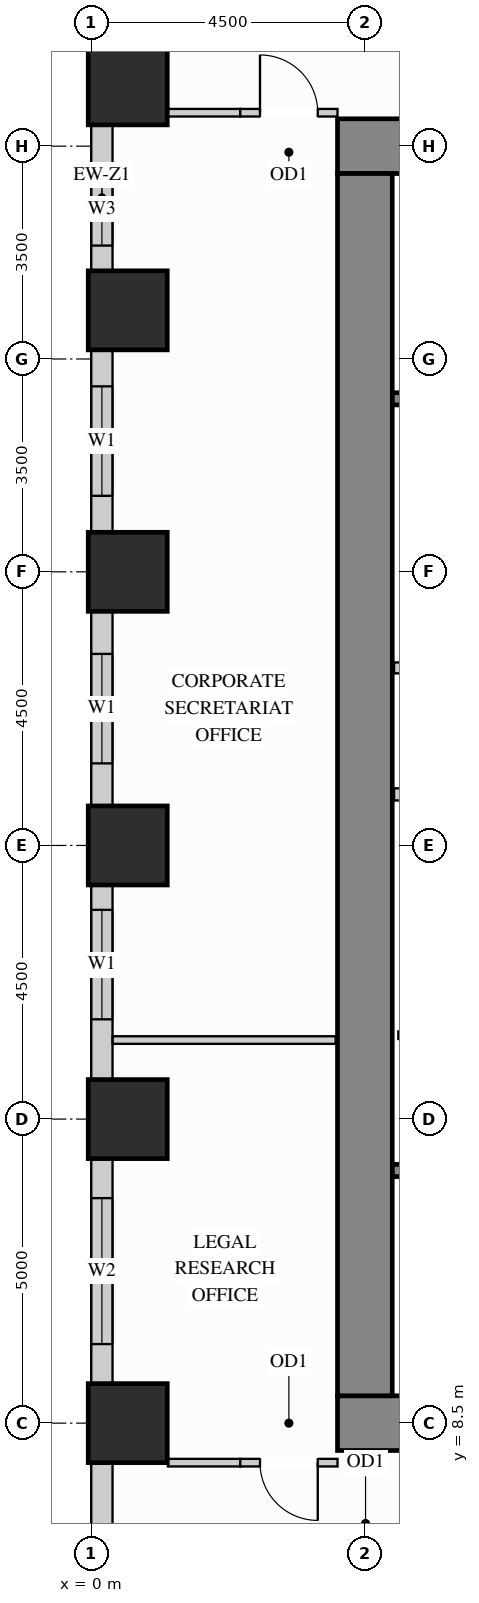
"""IFC4 building model, lengths in metres.
Left out: names, types, materials, properties, quantities, classifications, styles, units other than length and angle.
Written with IfcOpenShell. Run it as: python <this file> out.ifc"""

import sys

from ifc_helpers import new_model, si_unit, direction, frame, frame_2d, origin, origin_2d, place, context, subcontext, project, spatial, rectangle, extrude, source, transform, mapped, element, fill, save


model = new_model("IFC4")
c1 = context("Model", 3, precision=1e-05, world=origin(), true_north=direction((0.0, 1.0)))
c2 = subcontext(c1, "Body", "Model", "MODEL_VIEW")
j1 = project(units=[si_unit("LENGTHUNIT", "METRE"), si_unit("PLANEANGLEUNIT", "RADIAN")], contexts=[c1])
p1 = place(None, origin())
s1 = spatial("IfcSite", under=j1, at=p1, CompositionType="ELEMENT")
p2 = place(p1, origin())
s2 = spatial("IfcBuilding", under=s1, at=p2, CompositionType="ELEMENT")
p3 = place(p2, frame((0.0, 0.0, 69.3)))
s3 = spatial("IfcBuildingStorey", under=s2, at=p3, CompositionType="ELEMENT", Elevation=69.3)
m1 = source(origin(), c2, "Body", "SweptSolid", [
    extrude(rectangle(XDim=1.3, YDim=1.3, at=origin_2d()), origin(), (0.0, 0.0, 1.0), 3.32),
])
for number, where, z_axis, x_axis in (
    (1, (0.6, 13.5, 0.0), (0.0, 0.0, 1.0), (1.0, 0.0, 0.0)),
    (2, (0.6, 18.0, 0.0), (0.0, 0.0, 1.0), (1.0, 0.0, 0.0)),
    (3, (0.6, 22.5, 0.0), (0.0, 0.0, 1.0), (1.0, 0.0, 0.0)),
    (4, (0.6, 26.8, 0.0), (0.0, 0.0, 1.0), (1.0, 0.0, 0.0)),
    (5, (0.6, 30.5, 0.0), (0.0, 0.0, 1.0), (1.0, 0.0, 0.0)),
    (6, (0.6, 8.5, 0.0), (0.0, 0.0, 1.0), (1.0, 0.0, 0.0)),
):
    element("IfcColumn", number, at=place(p3, frame(where, z_axis=z_axis, x_axis=x_axis)), inside=s3, PredefinedType="COLUMN", context=c2, shape_type="MappedRepresentation", body=[
        mapped(m1, transform((0.0, 0.0, 0.0), x_axis=(1.0, 0.0, 0.0), y_axis=(0.0, 1.0, 0.0), z_axis=(0.0, 0.0, 1.0))),
    ])
m2 = source(origin(), c2, "Body", "SweptSolid", [
    extrude(rectangle(XDim=10.9, YDim=0.9, at=frame_2d((5.45, 0.0))), origin(), (0.0, 0.0, 1.0), 3.32),
])
for number, where, z_axis, x_axis in (
    (7, (4.05, 29.5, 0.0), (0.0, 0.0, 1.0), (1.0, 0.0, 0.0)),
    (8, (4.05, 8.5, 0.0), (0.0, 0.0, 1.0), (1.0, 0.0, 0.0)),
):
    element("IfcWall", number, at=place(p3, frame(where, z_axis=z_axis, x_axis=x_axis)), inside=s3, PredefinedType="SHEAR", context=c2, shape_type="MappedRepresentation", body=[
        mapped(m2, transform((0.0, 0.0, 0.0), x_axis=(1.0, 0.0, 0.0), y_axis=(0.0, 1.0, 0.0), z_axis=(0.0, 0.0, 1.0))),
    ])
m3 = source(origin(), c2, "Body", "SweptSolid", [
    extrude(rectangle(XDim=20.1, YDim=0.9, at=frame_2d((10.05, 0.0))), origin(), (0.0, 0.0, 1.0), 3.32),
])
p4 = place(p3, frame((4.5, 8.95, 0.0), z_axis=(0.0, 0.0, 1.0), x_axis=(0.0, 1.0, 0.0)))
e9 = element("IfcWall", 9, at=p4, inside=s3, PredefinedType="SHEAR", context=c2, shape_type="MappedRepresentation", body=[
    mapped(m3, transform((0.0, 0.0, 0.0), x_axis=(1.0, 0.0, 0.0), y_axis=(0.0, 1.0, 0.0), z_axis=(0.0, 0.0, 1.0))),
])
p5 = place(p3, frame((0.175, 29.852, 0.0), z_axis=(0.0, 0.0, 1.0), x_axis=(0.0, -1.0, 0.0)))
e10 = element("IfcWall", 10, at=p5, inside=s3, PredefinedType="SOLIDWALL", context=c2, shape_type="SweptSolid", body=[
    extrude(rectangle(XDim=2.404, YDim=0.35, at=frame_2d((1.202, 0.0))), origin(), (0.0, 0.0, 1.0), 2.45),
])
p6 = place(p5, frame((0.787, 0.0, 0.78)))
e11 = element("IfcOpeningElement", 11, at=p6, cuts=e10, PredefinedType="OPENING", context=c2, shape_type="SweptSolid", body=[
    extrude(rectangle(XDim=1.2, YDim=1.49, at=frame_2d((0.6, 0.745))), frame((0.0, 0.185, 0.0), z_axis=(0.0, -1.0, 0.0), x_axis=(1.0, 0.0, 0.0)), (0.0, 0.0, 1.0), 0.37),
])
p7 = place(p3, frame((0.175, 26.152, 0.0), z_axis=(0.0, 0.0, 1.0), x_axis=(0.0, -1.0, 0.0)))
e12 = element("IfcWall", 12, at=p7, inside=s3, PredefinedType="SOLIDWALL", context=c2, shape_type="SweptSolid", body=[
    extrude(rectangle(XDim=3.004, YDim=0.35, at=frame_2d((1.502, 0.0))), origin(), (0.0, 0.0, 1.0), 2.45),
])
p8 = place(p7, frame((0.602, 0.0, 0.78)))
e13 = element("IfcOpeningElement", 13, at=p8, cuts=e12, PredefinedType="OPENING", context=c2, shape_type="SweptSolid", body=[
    extrude(rectangle(XDim=1.8, YDim=1.49, at=frame_2d((0.9, 0.745))), frame((0.0, 0.185, 0.0), z_axis=(0.0, -1.0, 0.0), x_axis=(1.0, 0.0, 0.0)), (0.0, 0.0, 1.0), 0.37),
])
p9 = place(p3, frame((0.175, 21.852, 0.0), z_axis=(0.0, 0.0, 1.0), x_axis=(0.0, -1.0, 0.0)))
e14 = element("IfcWall", 14, at=p9, inside=s3, PredefinedType="SOLIDWALL", context=c2, shape_type="SweptSolid", body=[
    extrude(rectangle(XDim=3.204, YDim=0.35, at=frame_2d((1.602, 0.0))), origin(), (0.0, 0.0, 1.0), 2.45),
])
p10 = place(p9, frame((0.702, 0.0, 0.78)))
e15 = element("IfcOpeningElement", 15, at=p10, cuts=e14, PredefinedType="OPENING", context=c2, shape_type="SweptSolid", body=[
    extrude(rectangle(XDim=1.8, YDim=1.49, at=frame_2d((0.9, 0.745))), frame((0.0, 0.185, 0.0), z_axis=(0.0, -1.0, 0.0), x_axis=(1.0, 0.0, 0.0)), (0.0, 0.0, 1.0), 0.37),
])
p11 = place(p3, frame((0.175, 17.352, 0.0), z_axis=(0.0, 0.0, 1.0), x_axis=(0.0, -1.0, 0.0)))
e16 = element("IfcWall", 16, at=p11, inside=s3, PredefinedType="SOLIDWALL", context=c2, shape_type="SweptSolid", body=[
    extrude(rectangle(XDim=3.204, YDim=0.35, at=frame_2d((1.602, 0.0))), origin(), (0.0, 0.0, 1.0), 2.45),
])
p12 = place(p11, frame((0.411, 0.0, 0.78)))
e17 = element("IfcOpeningElement", 17, at=p12, cuts=e16, PredefinedType="OPENING", context=c2, shape_type="SweptSolid", body=[
    extrude(rectangle(XDim=1.8, YDim=1.49, at=frame_2d((0.9, 0.745))), frame((0.0, 0.185, 0.0), z_axis=(0.0, -1.0, 0.0), x_axis=(1.0, 0.0, 0.0)), (0.0, 0.0, 1.0), 0.37),
])
p13 = place(p3, frame((0.175, 12.852, 0.0), z_axis=(0.0, 0.0, 1.0), x_axis=(0.0, -1.0, 0.0)))
e18 = element("IfcWall", 18, at=p13, inside=s3, PredefinedType="SOLIDWALL", context=c2, shape_type="SweptSolid", body=[
    extrude(rectangle(XDim=3.704, YDim=0.35, at=frame_2d((1.852, 0.0))), origin(), (0.0, 0.0, 1.0), 2.45),
])
p14 = place(p13, frame((0.652, 0.0, 0.78)))
e19 = element("IfcOpeningElement", 19, at=p14, cuts=e18, PredefinedType="OPENING", context=c2, shape_type="SweptSolid", body=[
    extrude(rectangle(XDim=2.4, YDim=1.49, at=frame_2d((1.2, 0.745))), frame((0.0, 0.185, 0.0), z_axis=(0.0, -1.0, 0.0), x_axis=(1.0, 0.0, 0.0)), (0.0, 0.0, 1.0), 0.37),
])
p15 = place(p3, frame((0.175, 7.852, 0.0), z_axis=(0.0, 0.0, 1.0), x_axis=(0.0, -1.0, 0.0)))
e20 = element("IfcWall", 20, at=p15, inside=s3, PredefinedType="SOLIDWALL", context=c2, shape_type="SweptSolid", body=[
    extrude(rectangle(XDim=3.704, YDim=0.35, at=frame_2d((1.852, 0.0))), origin(), (0.0, 0.0, 1.0), 2.45),
])
p16 = place(p15, frame((2.043, 0.0, 0.78)))
e21 = element("IfcOpeningElement", 21, at=p16, cuts=e20, PredefinedType="OPENING", context=c2, shape_type="SweptSolid", body=[
    extrude(rectangle(XDim=1.2, YDim=1.49, at=frame_2d((0.6, 0.745))), frame((0.0, 0.185, 0.0), z_axis=(0.0, -1.0, 0.0), x_axis=(1.0, 0.0, 0.0)), (0.0, 0.0, 1.0), 0.37),
])
m4 = source(origin(), c2, "Body", "SweptSolid", [
    extrude(rectangle(XDim=2.17, YDim=0.18, at=frame_2d((1.085, 0.0))), origin(), (0.0, 0.0, 1.0), 3.305),
])
p17 = place(p3, frame((4.98, 20.92, 0.0), z_axis=(0.0, 0.0, 1.0), x_axis=(1.0, 0.0, 0.0)))
e22 = element("IfcWall", 22, at=p17, inside=s3, PredefinedType="PARTITIONING", context=c2, shape_type="MappedRepresentation", body=[
    mapped(m4, transform((0.0, 0.0, 0.0), x_axis=(1.0, 0.0, 0.0), y_axis=(0.0, 1.0, 0.0), z_axis=(0.0, 0.0, 1.0))),
])
p18 = place(p3, frame((5.05, 14.88, 0.0), z_axis=(0.0, 0.0, 1.0), x_axis=(1.0, 0.0, 0.0)))
e23 = element("IfcWall", 23, at=p18, inside=s3, PredefinedType="PARTITIONING", context=c2, shape_type="SweptSolid", body=[
    extrude(rectangle(XDim=2.35, YDim=0.125, at=frame_2d((1.175, 0.0))), origin(), (0.0, 0.0, 1.0), 3.305),
])
p19 = place(p18, frame((0.7, 0.0, 0.0)))
e24 = element("IfcOpeningElement", 24, at=p19, cuts=e23, PredefinedType="OPENING", context=c2, shape_type="SweptSolid", body=[
    extrude(rectangle(XDim=0.85, YDim=2.1, at=frame_2d((0.425, 1.05))), frame((0.0, 0.073, 0.0), z_axis=(0.0, -1.0, 0.0), x_axis=(1.0, 0.0, 0.0)), (0.0, 0.0, 1.0), 0.145),
])
m5 = source(origin(), c2, "Body", "SweptSolid", [
    extrude(rectangle(XDim=1.19, YDim=0.125, at=frame_2d((0.595, 0.0))), origin(), (0.0, 0.0, 1.0), 3.305),
])
p20 = place(p3, frame((1.26, 30.05, 0.0), z_axis=(0.0, 0.0, 1.0), x_axis=(1.0, 0.0, 0.0)))
e25 = element("IfcWall", 25, at=p20, inside=s3, PredefinedType="PARTITIONING", context=c2, shape_type="MappedRepresentation", body=[
    mapped(m5, transform((0.0, 0.0, 0.0), x_axis=(1.0, 0.0, 0.0), y_axis=(0.0, 1.0, 0.0), z_axis=(0.0, 0.0, 1.0))),
])
p21 = place(p3, frame((2.45, 30.05, 0.0), z_axis=(0.0, 0.0, 1.0), x_axis=(1.0, 0.0, 0.0)))
e26 = element("IfcWall", 26, at=p21, inside=s3, PredefinedType="PARTITIONING", context=c2, shape_type="SweptSolid", body=[
    extrude(rectangle(XDim=1.6, YDim=0.125, at=frame_2d((0.8, 0.0))), origin(), (0.0, 0.0, 1.0), 3.305),
])
p22 = place(p21, frame((0.325, 0.0, 0.0)))
e27 = element("IfcOpeningElement", 27, at=p22, cuts=e26, PredefinedType="OPENING", context=c2, shape_type="SweptSolid", body=[
    extrude(rectangle(XDim=0.95, YDim=2.15, at=frame_2d((0.475, 1.075))), frame((0.0, 0.073, 0.0), z_axis=(0.0, -1.0, 0.0), x_axis=(1.0, 0.0, 0.0)), (0.0, 0.0, 1.0), 0.145),
])
p23 = place(p3, frame((1.26, 7.85, 0.0), z_axis=(0.0, 0.0, 1.0), x_axis=(1.0, 0.0, 0.0)))
e28 = element("IfcWall", 28, at=p23, inside=s3, PredefinedType="PARTITIONING", context=c2, shape_type="MappedRepresentation", body=[
    mapped(m5, transform((0.0, 0.0, 0.0), x_axis=(1.0, 0.0, 0.0), y_axis=(0.0, 1.0, 0.0), z_axis=(0.0, 0.0, 1.0))),
])
p24 = place(p3, frame((2.45, 7.85, 0.0), z_axis=(0.0, 0.0, 1.0), x_axis=(1.0, 0.0, 0.0)))
e29 = element("IfcWall", 29, at=p24, inside=s3, PredefinedType="PARTITIONING", context=c2, shape_type="SweptSolid", body=[
    extrude(rectangle(XDim=1.6, YDim=0.125, at=frame_2d((0.8, 0.0))), origin(), (0.0, 0.0, 1.0), 3.305),
])
p25 = place(p24, frame((0.325, 0.0, 0.0)))
e30 = element("IfcOpeningElement", 30, at=p25, cuts=e29, PredefinedType="OPENING", context=c2, shape_type="SweptSolid", body=[
    extrude(rectangle(XDim=0.95, YDim=2.15, at=frame_2d((0.475, 1.075))), frame((0.0, 0.073, 0.0), z_axis=(0.0, -1.0, 0.0), x_axis=(1.0, 0.0, 0.0)), (0.0, 0.0, 1.0), 0.145),
])
m6 = source(origin(), c2, "Body", "SweptSolid", [
    extrude(rectangle(XDim=3.668, YDim=0.125, at=frame_2d((1.834, 0.0))), origin(), (0.0, 0.0, 1.0), 3.305),
])
p26 = place(p3, frame((0.352, 14.8, 0.0), z_axis=(0.0, 0.0, 1.0), x_axis=(1.0, 0.0, 0.0)))
e31 = element("IfcWall", 31, at=p26, inside=s3, PredefinedType="PARTITIONING", context=c2, shape_type="MappedRepresentation", body=[
    mapped(m6, transform((0.0, 0.0, 0.0), x_axis=(1.0, 0.0, 0.0), y_axis=(0.0, 1.0, 0.0), z_axis=(0.0, 0.0, 1.0))),
])
m7 = source(origin(), c2, "Body", "SweptSolid", [
    extrude(rectangle(XDim=2.09, YDim=0.2, at=frame_2d((1.045, 0.0))), origin(), (0.0, 0.0, 1.0), 3.305),
])
p27 = place(p3, frame((4.98, 18.84, 0.0), z_axis=(0.0, 0.0, 1.0), x_axis=(1.0, 0.0, 0.0)))
e32 = element("IfcWall", 32, at=p27, inside=s3, PredefinedType="PARTITIONING", context=c2, shape_type="MappedRepresentation", body=[
    mapped(m7, transform((0.0, 0.0, 0.0), x_axis=(1.0, 0.0, 0.0), y_axis=(0.0, 1.0, 0.0), z_axis=(0.0, 0.0, 1.0))),
])
p28 = place(p3, frame((4.952, 12.655, 0.0), z_axis=(0.0, 0.0, 1.0), x_axis=(1.0, 0.0, 0.0)))
e33 = element("IfcWall", 33, at=p28, inside=s3, PredefinedType="SHEAR", context=c2, shape_type="SweptSolid", body=[
    extrude(rectangle(XDim=7.453, YDim=0.2, at=frame_2d((3.727, 0.0))), origin(), (0.0, 0.0, 1.0), 3.32),
])
p29 = place(p28, frame((0.4, 0.0, 0.0)))
e34 = element("IfcOpeningElement", 34, at=p29, cuts=e33, PredefinedType="OPENING", context=c2, shape_type="SweptSolid", body=[
    extrude(rectangle(XDim=1.1, YDim=2.15, at=frame_2d((0.55, 1.075))), frame((0.0, 0.11, 0.0), z_axis=(0.0, -1.0, 0.0), x_axis=(1.0, 0.0, 0.0)), (0.0, 0.0, 1.0), 0.22),
])
p30 = place(p3, frame((4.952, 25.345, 0.0), z_axis=(0.0, 0.0, 1.0), x_axis=(1.0, 0.0, 0.0)))
e35 = element("IfcWall", 35, at=p30, inside=s3, PredefinedType="SHEAR", context=c2, shape_type="SweptSolid", body=[
    extrude(rectangle(XDim=7.453, YDim=0.2, at=frame_2d((3.727, 0.0))), origin(), (0.0, 0.0, 1.0), 3.32),
])
p31 = place(p30, frame((0.4, 0.0, 0.0)))
e36 = element("IfcOpeningElement", 36, at=p31, cuts=e35, PredefinedType="OPENING", context=c2, shape_type="SweptSolid", body=[
    extrude(rectangle(XDim=1.1, YDim=2.15, at=frame_2d((0.55, 1.075))), frame((0.0, 0.11, 0.0), z_axis=(0.0, -1.0, 0.0), x_axis=(1.0, 0.0, 0.0)), (0.0, 0.0, 1.0), 0.22),
])
m8 = source(origin(), c2, "Body", "SweptSolid", [
    extrude(rectangle(XDim=0.95, YDim=2.15, at=frame_2d((0.475, 1.075))), frame((0.0, 0.025, 0.0), z_axis=(0.0, -1.0, 0.0), x_axis=(1.0, 0.0, 0.0)), (0.0, 0.0, 1.0), 0.05),
])
p32 = place(p25, origin())
e37 = element("IfcDoor", 37, at=p32, inside=s3, OperationType="SINGLE_SWING_RIGHT", PredefinedType="DOOR", context=c2, shape_type="MappedRepresentation", body=[
    mapped(m8, transform((0.0, 0.0, 0.0), x_axis=(1.0, 0.0, 0.0), y_axis=(0.0, 1.0, 0.0), z_axis=(0.0, 0.0, 1.0))),
])
fill(e30, e37)
p33 = place(p22, origin())
e38 = element("IfcDoor", 38, at=p33, inside=s3, OperationType="SINGLE_SWING_LEFT", PredefinedType="DOOR", context=c2, shape_type="MappedRepresentation", body=[
    mapped(m8, transform((0.0, 0.0, 0.0), x_axis=(1.0, 0.0, 0.0), y_axis=(0.0, 1.0, 0.0), z_axis=(0.0, 0.0, 1.0))),
])
fill(e27, e38)
m9 = source(origin(), c2, "Body", "SweptSolid", [
    extrude(rectangle(XDim=1.8, YDim=1.49, at=frame_2d((0.9, 0.745))), frame((0.0, 0.03, 0.0), z_axis=(0.0, -1.0, 0.0), x_axis=(1.0, 0.0, 0.0)), (0.0, 0.0, 1.0), 0.06),
])
p34 = place(p8, origin())
e39 = element("IfcWindow", 39, at=p34, inside=s3, PartitioningType="SINGLE_PANEL", PredefinedType="WINDOW", context=c2, shape_type="MappedRepresentation", body=[
    mapped(m9, transform((0.0, 0.0, 0.0), x_axis=(1.0, 0.0, 0.0), y_axis=(0.0, 1.0, 0.0), z_axis=(0.0, 0.0, 1.0))),
])
fill(e13, e39)
p35 = place(p10, origin())
e40 = element("IfcWindow", 40, at=p35, inside=s3, PartitioningType="SINGLE_PANEL", PredefinedType="WINDOW", context=c2, shape_type="MappedRepresentation", body=[
    mapped(m9, transform((0.0, 0.0, 0.0), x_axis=(1.0, 0.0, 0.0), y_axis=(0.0, 1.0, 0.0), z_axis=(0.0, 0.0, 1.0))),
])
fill(e15, e40)
p36 = place(p12, origin())
e41 = element("IfcWindow", 41, at=p36, inside=s3, PartitioningType="SINGLE_PANEL", PredefinedType="WINDOW", context=c2, shape_type="MappedRepresentation", body=[
    mapped(m9, transform((0.0, 0.0, 0.0), x_axis=(1.0, 0.0, 0.0), y_axis=(0.0, 1.0, 0.0), z_axis=(0.0, 0.0, 1.0))),
])
fill(e17, e41)
m10 = source(origin(), c2, "Body", "SweptSolid", [
    extrude(rectangle(XDim=2.4, YDim=1.49, at=frame_2d((1.2, 0.745))), frame((0.0, 0.03, 0.0), z_axis=(0.0, -1.0, 0.0), x_axis=(1.0, 0.0, 0.0)), (0.0, 0.0, 1.0), 0.06),
])
p37 = place(p14, origin())
e42 = element("IfcWindow", 42, at=p37, inside=s3, PartitioningType="SINGLE_PANEL", PredefinedType="WINDOW", context=c2, shape_type="MappedRepresentation", body=[
    mapped(m10, transform((0.0, 0.0, 0.0), x_axis=(1.0, 0.0, 0.0), y_axis=(0.0, 1.0, 0.0), z_axis=(0.0, 0.0, 1.0))),
])
fill(e19, e42)
m11 = source(origin(), c2, "Body", "SweptSolid", [
    extrude(rectangle(XDim=1.2, YDim=1.49, at=frame_2d((0.6, 0.745))), frame((0.0, 0.03, 0.0), z_axis=(0.0, -1.0, 0.0), x_axis=(1.0, 0.0, 0.0)), (0.0, 0.0, 1.0), 0.06),
])
p38 = place(p6, origin())
e43 = element("IfcWindow", 43, at=p38, inside=s3, PartitioningType="SINGLE_PANEL", PredefinedType="WINDOW", context=c2, shape_type="MappedRepresentation", body=[
    mapped(m11, transform((0.0, 0.0, 0.0), x_axis=(1.0, 0.0, 0.0), y_axis=(0.0, 1.0, 0.0), z_axis=(0.0, 0.0, 1.0))),
])
fill(e11, e43)
save(model, sys.argv[1])
